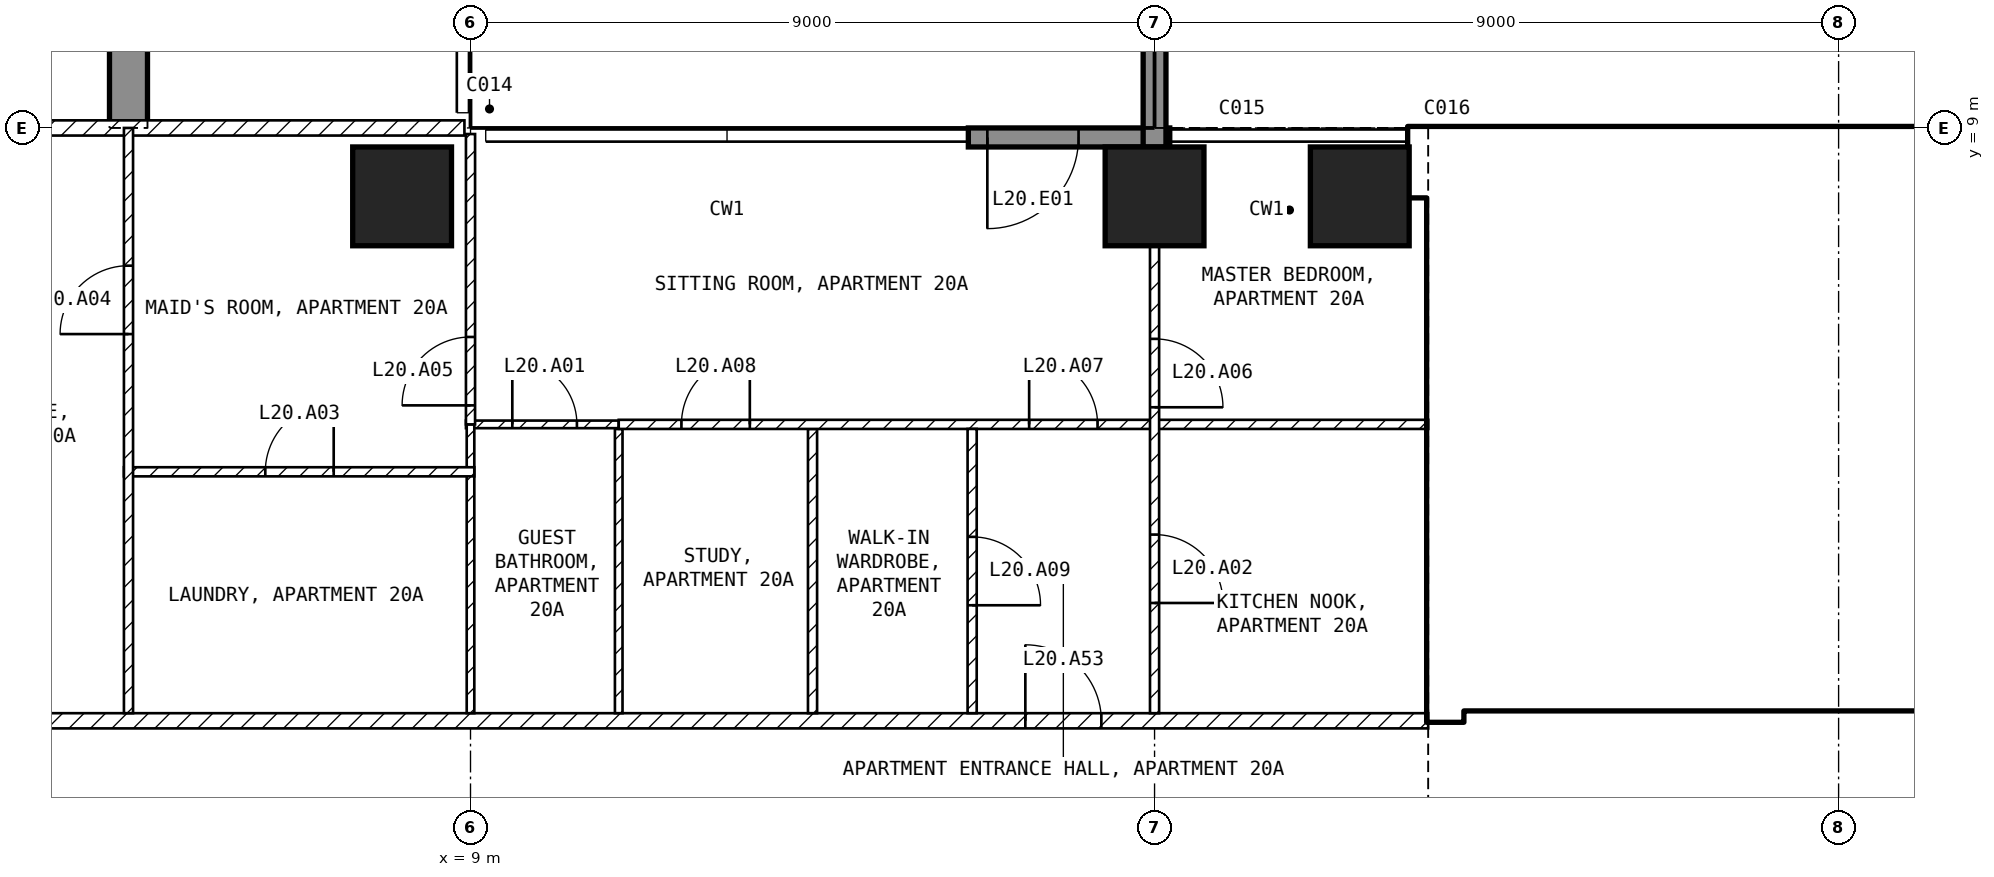
"""IFC4 building model, lengths in metres.
Left out: names, types, materials, properties, quantities, classifications, styles, units other than length and angle.
Written with IfcOpenShell. Run it as: python <this file> out.ifc"""

import sys

from ifc_helpers import new_model, si_unit, direction, frame, frame_2d, origin, origin_2d, place, context, subcontext, project, spatial, polyline, rectangle, outline, extrude, element, fill, save


model = new_model("IFC4")
c1 = context("Model", 3, precision=1e-05, world=origin(), true_north=direction((0.0, 1.0)))
c2 = subcontext(c1, "Body", "Model", "MODEL_VIEW")
j1 = project(units=[si_unit("LENGTHUNIT", "METRE"), si_unit("PLANEANGLEUNIT", "RADIAN")], contexts=[c1])
p1 = place(None, origin())
s1 = spatial("IfcSite", under=j1, at=p1, CompositionType="ELEMENT")
p2 = place(p1, origin())
s2 = spatial("IfcBuilding", under=s1, at=p2, CompositionType="ELEMENT")
p3 = place(p2, frame((0.0, 0.0, 89.0)))
s3 = spatial("IfcBuildingStorey", under=s2, at=p3, CompositionType="ELEMENT", Elevation=89.0)
for number, where, z_axis, x_axis in (
    (1, (8.1, 8.1, -0.25), (0.0, 0.0, 1.0), (1.0, 0.0, 0.0)),
    (2, (18.0, 8.1, -0.25), (0.0, 0.0, 1.0), (1.0, 0.0, 0.0)),
    (3, (20.7, 8.1, -0.25), (0.0, 0.0, 1.0), (1.0, 0.0, 0.0)),
):
    element("IfcColumn", number, at=place(p3, frame(where, z_axis=z_axis, x_axis=x_axis)), inside=s3, PredefinedType="COLUMN", context=c2, shape_type="SweptSolid", body=[
        extrude(rectangle(XDim=1.3, YDim=1.3, at=origin_2d()), origin(), (0.0, 0.0, 1.0), 3.45),
    ])
p4 = place(p3, frame((4.25, 9.0, -0.25), z_axis=(1.0, 0.0, 0.0), x_axis=(0.0, 1.0, 0.0)))
e4 = element("IfcWall", 4, at=p4, inside=s3, PredefinedType="SHEAR", context=c2, shape_type="SweptSolid", body=[
    extrude(outline(polyline([(0.0, 0.0), (2.1, 0.0), (2.1, 2.65), (4.5, 2.65), (4.5, 0.0), (9.9, 0.0), (9.9, 2.65), (12.3, 2.65), (12.3, 0.0), (16.45, 0.0), (16.45, 3.45), (0.0, 3.45), (0.0, 0.0)])), origin(), (0.0, 0.0, 1.0), 0.5),
])
p5 = place(p3, frame((18.2, 8.875, 0.0), z_axis=(0.0, 0.0, 1.0), x_axis=(-1.0, 0.0, 0.0)))
e5 = element("IfcWall", 5, at=p5, inside=s3, PredefinedType="SOLIDWALL", context=c2, shape_type="SweptSolid", body=[
    extrude(rectangle(XDim=2.65, YDim=0.25, at=frame_2d((1.325, 0.0))), origin(), (0.0, 0.0, 1.0), 3.2),
])
p6 = place(p5, frame((1.2, 0.0, 0.0)))
e6 = element("IfcOpeningElement", 6, at=p6, cuts=e5, PredefinedType="OPENING", context=c2, shape_type="SweptSolid", body=[
    extrude(rectangle(XDim=1.2, YDim=2.4, at=frame_2d((0.6, 1.2))), frame((0.0, 0.135, 0.0), z_axis=(0.0, -1.0, 0.0), x_axis=(1.0, 0.0, 0.0)), (0.0, 0.0, 1.0), 0.27),
])
p7 = place(p3, frame((18.0, 8.75, 0.0), z_axis=(0.0, 0.0, 1.0), x_axis=(0.0, 1.0, 0.0)))
e7 = element("IfcWall", 7, at=p7, inside=s3, PredefinedType="SOLIDWALL", context=c2, shape_type="SweptSolid", body=[
    extrude(rectangle(XDim=2.95, YDim=0.3, at=frame_2d((1.475, 0.0))), origin(), (0.0, 0.0, 1.0), 3.2),
])
p8 = place(p3, frame((21.35, 8.55, 0.0), z_axis=(0.0, 0.0, 1.0), x_axis=(1.0, 0.0, 0.0)))
e8 = element("IfcWall", 8, at=p8, inside=s3, PredefinedType="SHEAR", context=c2, shape_type="SweptSolid", body=[
    extrude(rectangle(XDim=10.15, YDim=0.9, at=frame_2d((5.075, 0.0))), origin(), (0.0, 0.0, 1.0), 3.2),
])
p9 = place(p3, frame((21.825, 1.2, 0.0), z_axis=(0.0, 0.0, 1.0), x_axis=(0.0, 1.0, 0.0)))
e9 = element("IfcWall", 9, at=p9, inside=s3, PredefinedType="SHEAR", context=c2, shape_type="SweptSolid", body=[
    extrude(rectangle(XDim=6.9, YDim=0.45, at=frame_2d((3.45, 0.0))), origin(), (0.0, 0.0, 1.0), 3.2),
])
p10 = place(p3, frame((22.05, 1.45, 0.0), z_axis=(0.0, 0.0, 1.0), x_axis=(1.0, 0.0, 0.0)))
e10 = element("IfcWall", 10, at=p10, inside=s3, PredefinedType="SOLIDWALL", context=c2, shape_type="SweptSolid", body=[
    extrude(rectangle(XDim=13.05, YDim=0.2, at=frame_2d((6.525, 0.0))), origin(), (0.0, 0.0, 1.0), 3.2),
])
p11 = place(p10, frame((0.75, 0.0, 0.0)))
e11 = element("IfcOpeningElement", 11, at=p11, cuts=e10, PredefinedType="OPENING", context=c2, shape_type="SweptSolid", body=[
    extrude(rectangle(XDim=1.0, YDim=2.1, at=frame_2d((0.5, 1.05))), frame((0.0, 0.11, 0.0), z_axis=(0.0, -1.0, 0.0), x_axis=(1.0, 0.0, 0.0)), (0.0, 0.0, 1.0), 0.22),
])
p12 = place(p10, frame((3.25, 0.0, 0.0)))
e12 = element("IfcOpeningElement", 12, at=p12, cuts=e10, PredefinedType="OPENING", context=c2, shape_type="SweptSolid", body=[
    extrude(rectangle(XDim=1.0, YDim=2.1, at=frame_2d((0.5, 1.05))), frame((0.0, 0.11, 0.0), z_axis=(0.0, -1.0, 0.0), x_axis=(1.0, 0.0, 0.0)), (0.0, 0.0, 1.0), 0.22),
])
p13 = place(p3, frame((22.05, 5.15, 0.0), z_axis=(0.0, 0.0, 1.0), x_axis=(1.0, 0.0, 0.0)))
e13 = element("IfcWall", 13, at=p13, inside=s3, PredefinedType="SOLIDWALL", context=c2, shape_type="SweptSolid", body=[
    extrude(rectangle(XDim=6.3, YDim=0.2, at=frame_2d((3.15, 0.0))), origin(), (0.0, 0.0, 1.0), 3.2),
])
p14 = place(p13, frame((0.2, 0.0, 0.0)))
e14 = element("IfcOpeningElement", 14, at=p14, cuts=e13, PredefinedType="OPENING", context=c2, shape_type="SweptSolid", body=[
    extrude(rectangle(XDim=1.0, YDim=2.1, at=frame_2d((0.5, 1.05))), frame((0.0, 0.11, 0.0), z_axis=(0.0, -1.0, 0.0), x_axis=(1.0, 0.0, 0.0)), (0.0, 0.0, 1.0), 0.22),
])
p15 = place(p3, frame((27.2, 3.95, 0.0), z_axis=(0.0, 0.0, 1.0), x_axis=(1.0, 0.0, 0.0)))
e15 = element("IfcWall", 15, at=p15, inside=s3, PredefinedType="SOLIDWALL", context=c2, shape_type="SweptSolid", body=[
    extrude(rectangle(XDim=7.9, YDim=0.2, at=frame_2d((3.95, 0.0))), origin(), (0.0, 0.0, 1.0), 3.2),
])
p16 = place(p3, frame((27.1, 1.55, 0.0), z_axis=(0.0, 0.0, 1.0), x_axis=(0.0, 1.0, 0.0)))
e16 = element("IfcWall", 16, at=p16, inside=s3, PredefinedType="SOLIDWALL", context=c2, shape_type="SweptSolid", body=[
    extrude(rectangle(XDim=3.5, YDim=0.2, at=frame_2d((1.75, 0.0))), origin(), (0.0, 0.0, 1.0), 3.2),
])
p17 = place(p16, frame((0.6, 0.0, 0.0)))
e17 = element("IfcOpeningElement", 17, at=p17, cuts=e16, PredefinedType="OPENING", context=c2, shape_type="SweptSolid", body=[
    extrude(rectangle(XDim=1.1, YDim=2.1, at=frame_2d((0.55, 1.05))), frame((0.0, 0.11, 0.0), z_axis=(0.0, -1.0, 0.0), x_axis=(1.0, 0.0, 0.0)), (0.0, 0.0, 1.0), 0.22),
])
p18 = place(p16, frame((2.6, 0.0, 0.0)))
e18 = element("IfcOpeningElement", 18, at=p18, cuts=e16, PredefinedType="OPENING", context=c2, shape_type="SweptSolid", body=[
    extrude(rectangle(XDim=0.8, YDim=2.1, at=frame_2d((0.4, 1.05))), frame((0.0, 0.11, 0.0), z_axis=(0.0, -1.0, 0.0), x_axis=(1.0, 0.0, 0.0)), (0.0, 0.0, 1.0), 0.22),
])
p19 = place(p3, frame((1.1, 1.2, 0.0), z_axis=(0.0, 0.0, 1.0), x_axis=(1.0, 0.0, 0.0)))
e19 = element("IfcWall", 19, at=p19, inside=s3, PredefinedType="PARTITIONING", context=c2, shape_type="SweptSolid", body=[
    extrude(rectangle(XDim=20.5, YDim=0.2, at=frame_2d((10.25, 0.0))), origin(), (0.0, 0.0, 1.0), 3.2),
])
p20 = place(p19, frame((15.2, 0.0, 0.0)))
e20 = element("IfcOpeningElement", 20, at=p20, cuts=e19, PredefinedType="OPENING", context=c2, shape_type="SweptSolid", body=[
    extrude(rectangle(XDim=1.0, YDim=2.1, at=frame_2d((0.5, 1.05))), frame((0.0, 0.11, 0.0), z_axis=(0.0, -1.0, 0.0), x_axis=(1.0, 0.0, 0.0)), (0.0, 0.0, 1.0), 0.22),
])
p21 = place(p3, frame((-8.92, 9.0, 0.0), z_axis=(0.0, 0.0, 1.0), x_axis=(1.0, 0.0, 0.0)))
e21 = element("IfcWall", 21, at=p21, inside=s3, PredefinedType="PARTITIONING", context=c2, shape_type="SweptSolid", body=[
    extrude(rectangle(XDim=17.84, YDim=0.2, at=frame_2d((8.92, 0.0))), origin(), (0.0, 0.0, 1.0), 3.2),
])
p22 = place(p21, frame((8.42, 0.0, 0.0)))
e22 = element("IfcOpeningElement", 22, at=p22, cuts=e21, PredefinedType="OPENING", context=c2, shape_type="SweptSolid", body=[
    extrude(rectangle(XDim=1.0, YDim=2.1, at=frame_2d((0.5, 1.05))), frame((0.0, 0.11, 0.0), z_axis=(0.0, -1.0, 0.0), x_axis=(1.0, 0.0, 0.0)), (0.0, 0.0, 1.0), 0.22),
])
p23 = place(p3, frame((10.95, 5.04, 0.0), z_axis=(0.0, 0.0, 1.0), x_axis=(0.0, -1.0, 0.0)))
e23 = element("IfcWall", 23, at=p23, inside=s3, PredefinedType="PARTITIONING", context=c2, shape_type="SweptSolid", body=[
    extrude(rectangle(XDim=3.74, YDim=0.1, at=frame_2d((1.87, 0.0))), origin(), (0.0, 0.0, 1.0), 3.2),
])
p24 = place(p3, frame((8.94, 5.1, 0.0), z_axis=(0.0, 0.0, 1.0), x_axis=(1.0, 0.0, 0.0)))
e24 = element("IfcWall", 24, at=p24, inside=s3, PredefinedType="PARTITIONING", context=c2, shape_type="SweptSolid", body=[
    extrude(rectangle(XDim=2.01, YDim=0.1, at=frame_2d((1.005, 0.0))), origin(), (0.0, 0.0, 1.0), 3.2),
])
p25 = place(p24, frame((0.61, 0.0, 0.0)))
e25 = element("IfcOpeningElement", 25, at=p25, cuts=e24, PredefinedType="OPENING", context=c2, shape_type="SweptSolid", body=[
    extrude(rectangle(XDim=0.85, YDim=2.1, at=frame_2d((0.425, 1.05))), frame((0.0, 0.06, 0.0), z_axis=(0.0, -1.0, 0.0), x_axis=(1.0, 0.0, 0.0)), (0.0, 0.0, 1.0), 0.12),
])
p26 = place(p3, frame((9.0, 1.3, 0.0), z_axis=(0.0, 0.0, 1.0), x_axis=(0.0, 1.0, 0.0)))
e26 = element("IfcWall", 26, at=p26, inside=s3, PredefinedType="PARTITIONING", context=c2, shape_type="SweptSolid", body=[
    extrude(rectangle(XDim=3.8, YDim=0.1, at=frame_2d((1.9, 0.0))), origin(), (0.0, 0.0, 1.0), 3.2),
])
p27 = place(p3, frame((13.5, 5.04, 0.0), z_axis=(0.0, 0.0, 1.0), x_axis=(0.0, -1.0, 0.0)))
e27 = element("IfcWall", 27, at=p27, inside=s3, PredefinedType="PARTITIONING", context=c2, shape_type="SweptSolid", body=[
    extrude(rectangle(XDim=3.74, YDim=0.12, at=frame_2d((1.87, 0.0))), origin(), (0.0, 0.0, 1.0), 3.2),
])
p28 = place(p3, frame((10.95, 5.1, 0.0), z_axis=(0.0, 0.0, 1.0), x_axis=(1.0, 0.0, 0.0)))
e28 = element("IfcWall", 28, at=p28, inside=s3, PredefinedType="PARTITIONING", context=c2, shape_type="SweptSolid", body=[
    extrude(rectangle(XDim=10.65, YDim=0.12, at=frame_2d((5.325, 0.0))), origin(), (0.0, 0.0, 1.0), 3.2),
])
p29 = place(p28, frame((5.4, 0.0, 0.0)))
e29 = element("IfcOpeningElement", 29, at=p29, cuts=e28, PredefinedType="OPENING", context=c2, shape_type="SweptSolid", body=[
    extrude(rectangle(XDim=0.9, YDim=2.1, at=frame_2d((0.45, 1.05))), frame((0.0, 0.07, 0.0), z_axis=(0.0, -1.0, 0.0), x_axis=(1.0, 0.0, 0.0)), (0.0, 0.0, 1.0), 0.14),
])
p30 = place(p28, frame((0.825, 0.0, 0.0)))
e30 = element("IfcOpeningElement", 30, at=p30, cuts=e28, PredefinedType="OPENING", context=c2, shape_type="SweptSolid", body=[
    extrude(rectangle(XDim=0.9, YDim=2.1, at=frame_2d((0.45, 1.05))), frame((0.0, 0.07, 0.0), z_axis=(0.0, -1.0, 0.0), x_axis=(1.0, 0.0, 0.0)), (0.0, 0.0, 1.0), 0.14),
])
p31 = place(p3, frame((15.6, 5.04, 0.0), z_axis=(0.0, 0.0, 1.0), x_axis=(0.0, -1.0, 0.0)))
e31 = element("IfcWall", 31, at=p31, inside=s3, PredefinedType="PARTITIONING", context=c2, shape_type="SweptSolid", body=[
    extrude(rectangle(XDim=3.74, YDim=0.12, at=frame_2d((1.87, 0.0))), origin(), (0.0, 0.0, 1.0), 3.2),
])
p32 = place(p31, frame((1.42, 0.0, 0.0)))
e32 = element("IfcOpeningElement", 32, at=p32, cuts=e31, PredefinedType="OPENING", context=c2, shape_type="SweptSolid", body=[
    extrude(rectangle(XDim=0.9, YDim=2.1, at=frame_2d((0.45, 1.05))), frame((0.0, 0.07, 0.0), z_axis=(0.0, -1.0, 0.0), x_axis=(1.0, 0.0, 0.0)), (0.0, 0.0, 1.0), 0.14),
])
p33 = place(p3, frame((18.0, 7.45, 0.0), z_axis=(0.0, 0.0, 1.0), x_axis=(0.0, -1.0, 0.0)))
e33 = element("IfcWall", 33, at=p33, inside=s3, PredefinedType="PARTITIONING", context=c2, shape_type="SweptSolid", body=[
    extrude(rectangle(XDim=6.15, YDim=0.12, at=frame_2d((3.075, 0.0))), origin(), (0.0, 0.0, 1.0), 2.296),
])
p34 = place(p33, frame((3.8, 0.0, 0.0)))
e34 = element("IfcOpeningElement", 34, at=p34, cuts=e33, PredefinedType="OPENING", context=c2, shape_type="SweptSolid", body=[
    extrude(rectangle(XDim=0.9, YDim=2.1, at=frame_2d((0.45, 1.05))), frame((0.0, 0.07, 0.0), z_axis=(0.0, -1.0, 0.0), x_axis=(1.0, 0.0, 0.0)), (0.0, 0.0, 1.0), 0.14),
])
p35 = place(p33, frame((1.225, 0.0, 0.0)))
e35 = element("IfcOpeningElement", 35, at=p35, cuts=e33, PredefinedType="OPENING", context=c2, shape_type="SweptSolid", body=[
    extrude(rectangle(XDim=0.9, YDim=2.1, at=frame_2d((0.45, 1.05))), frame((0.0, 0.07, 0.0), z_axis=(0.0, -1.0, 0.0), x_axis=(1.0, 0.0, 0.0)), (0.0, 0.0, 1.0), 0.14),
])
p36 = place(p3, frame((9.0, 5.1, 0.0), z_axis=(0.0, 0.0, 1.0), x_axis=(0.0, 1.0, 0.0)))
e36 = element("IfcWall", 36, at=p36, inside=s3, PredefinedType="PARTITIONING", context=c2, shape_type="SweptSolid", body=[
    extrude(rectangle(XDim=3.82, YDim=0.12, at=frame_2d((1.91, 0.0))), origin(), (0.0, 0.0, 1.0), 3.2),
])
p37 = place(p36, frame((0.25, 0.0, 0.0)))
e37 = element("IfcOpeningElement", 37, at=p37, cuts=e36, PredefinedType="OPENING", context=c2, shape_type="SweptSolid", body=[
    extrude(rectangle(XDim=0.9, YDim=2.1, at=frame_2d((0.45, 1.05))), frame((0.0, 0.07, 0.0), z_axis=(0.0, -1.0, 0.0), x_axis=(1.0, 0.0, 0.0)), (0.0, 0.0, 1.0), 0.14),
])
p38 = place(p3, frame((4.44, 4.476, 0.0), z_axis=(0.0, 0.0, 1.0), x_axis=(1.0, 0.0, 0.0)))
e38 = element("IfcWall", 38, at=p38, inside=s3, PredefinedType="PARTITIONING", context=c2, shape_type="SweptSolid", body=[
    extrude(rectangle(XDim=4.61, YDim=0.12, at=frame_2d((2.305, 0.0))), origin(), (0.0, 0.0, 1.0), 3.2),
])
p39 = place(p38, frame((1.86, 0.0, 0.0)))
e39 = element("IfcOpeningElement", 39, at=p39, cuts=e38, PredefinedType="OPENING", context=c2, shape_type="SweptSolid", body=[
    extrude(rectangle(XDim=0.9, YDim=2.1, at=frame_2d((0.45, 1.05))), frame((0.0, 0.07, 0.0), z_axis=(0.0, -1.0, 0.0), x_axis=(1.0, 0.0, 0.0)), (0.0, 0.0, 1.0), 0.14),
])
p40 = place(p3, frame((4.5, 1.3, 0.0), z_axis=(0.0, 0.0, 1.0), x_axis=(0.0, 1.0, 0.0)))
e40 = element("IfcWall", 40, at=p40, inside=s3, PredefinedType="PARTITIONING", context=c2, shape_type="SweptSolid", body=[
    extrude(rectangle(XDim=7.7, YDim=0.12, at=frame_2d((3.85, 0.0))), origin(), (0.0, 0.0, 1.0), 3.2),
])
p41 = place(p40, frame((4.988, 0.0, 0.0)))
e41 = element("IfcOpeningElement", 41, at=p41, cuts=e40, PredefinedType="OPENING", context=c2, shape_type="SweptSolid", body=[
    extrude(rectangle(XDim=0.9, YDim=2.1, at=frame_2d((0.45, 1.05))), frame((0.0, 0.07, 0.0), z_axis=(0.0, -1.0, 0.0), x_axis=(1.0, 0.0, 0.0)), (0.0, 0.0, 1.0), 0.14),
])
p42 = place(p6, origin())
e42 = element("IfcDoor", 42, at=p42, inside=s3, OperationType="SINGLE_SWING_RIGHT", PredefinedType="DOOR", context=c2, shape_type="SweptSolid", body=[
    extrude(rectangle(XDim=1.2, YDim=2.4, at=frame_2d((0.6, 1.2))), frame((0.0, 0.025, 0.0), z_axis=(0.0, -1.0, 0.0), x_axis=(1.0, 0.0, 0.0)), (0.0, 0.0, 1.0), 0.05),
])
fill(e6, e42)
p43 = place(p17, origin())
e43 = element("IfcDoor", 43, at=p43, inside=s3, OperationType="DOUBLE_DOOR_SLIDING", PredefinedType="DOOR", context=c2, shape_type="SweptSolid", body=[
    extrude(rectangle(XDim=1.1, YDim=2.1, at=frame_2d((0.55, 1.05))), frame((0.0, 0.025, 0.0), z_axis=(0.0, -1.0, 0.0), x_axis=(1.0, 0.0, 0.0)), (0.0, 0.0, 1.0), 0.05),
])
fill(e17, e43)
p44 = place(p14, origin())
e44 = element("IfcDoor", 44, at=p44, inside=s3, OperationType="SINGLE_SWING_LEFT", PredefinedType="DOOR", context=c2, shape_type="SweptSolid", body=[
    extrude(rectangle(XDim=1.0, YDim=2.1, at=frame_2d((0.5, 1.05))), frame((0.0, 0.025, 0.0), z_axis=(0.0, -1.0, 0.0), x_axis=(1.0, 0.0, 0.0)), (0.0, 0.0, 1.0), 0.05),
])
fill(e14, e44)
p45 = place(p11, origin())
e45 = element("IfcDoor", 45, at=p45, inside=s3, OperationType="SINGLE_SWING_LEFT", PredefinedType="DOOR", context=c2, shape_type="SweptSolid", body=[
    extrude(rectangle(XDim=1.0, YDim=2.1, at=frame_2d((0.5, 1.05))), frame((0.0, 0.025, 0.0), z_axis=(0.0, -1.0, 0.0), x_axis=(1.0, 0.0, 0.0)), (0.0, 0.0, 1.0), 0.05),
])
fill(e11, e45)
p46 = place(p12, origin())
e46 = element("IfcDoor", 46, at=p46, inside=s3, OperationType="SINGLE_SWING_LEFT", PredefinedType="DOOR", context=c2, shape_type="SweptSolid", body=[
    extrude(rectangle(XDim=1.0, YDim=2.1, at=frame_2d((0.5, 1.05))), frame((0.0, 0.025, 0.0), z_axis=(0.0, -1.0, 0.0), x_axis=(1.0, 0.0, 0.0)), (0.0, 0.0, 1.0), 0.05),
])
fill(e12, e46)
p47 = place(p18, origin())
e47 = element("IfcDoor", 47, at=p47, inside=s3, OperationType="SINGLE_SWING_LEFT", PredefinedType="DOOR", context=c2, shape_type="SweptSolid", body=[
    extrude(rectangle(XDim=0.8, YDim=2.1, at=frame_2d((0.4, 1.05))), frame((0.0, 0.025, 0.0), z_axis=(0.0, -1.0, 0.0), x_axis=(1.0, 0.0, 0.0)), (0.0, 0.0, 1.0), 0.05),
])
fill(e18, e47)
p48 = place(p25, origin())
e48 = element("IfcDoor", 48, at=p48, inside=s3, OperationType="SINGLE_SWING_LEFT", PredefinedType="DOOR", context=c2, shape_type="SweptSolid", body=[
    extrude(rectangle(XDim=0.85, YDim=2.1, at=frame_2d((0.425, 1.05))), frame((0.0, 0.025, 0.0), z_axis=(0.0, -1.0, 0.0), x_axis=(1.0, 0.0, 0.0)), (0.0, 0.0, 1.0), 0.05),
])
fill(e25, e48)
p49 = place(p34, origin())
e49 = element("IfcDoor", 49, at=p49, inside=s3, OperationType="SINGLE_SWING_RIGHT", PredefinedType="DOOR", context=c2, shape_type="SweptSolid", body=[
    extrude(rectangle(XDim=0.9, YDim=2.1, at=frame_2d((0.45, 1.05))), frame((0.0, 0.025, 0.0), z_axis=(0.0, -1.0, 0.0), x_axis=(1.0, 0.0, 0.0)), (0.0, 0.0, 1.0), 0.05),
])
fill(e34, e49)
p50 = place(p39, origin())
e50 = element("IfcDoor", 50, at=p50, inside=s3, OperationType="SINGLE_SWING_RIGHT", PredefinedType="DOOR", context=c2, shape_type="SweptSolid", body=[
    extrude(rectangle(XDim=0.9, YDim=2.1, at=frame_2d((0.45, 1.05))), frame((0.0, 0.025, 0.0), z_axis=(0.0, -1.0, 0.0), x_axis=(1.0, 0.0, 0.0)), (0.0, 0.0, 1.0), 0.05),
])
fill(e39, e50)
p51 = place(p41, origin())
e51 = element("IfcDoor", 51, at=p51, inside=s3, OperationType="SINGLE_SWING_LEFT", PredefinedType="DOOR", context=c2, shape_type="SweptSolid", body=[
    extrude(rectangle(XDim=0.9, YDim=2.1, at=frame_2d((0.45, 1.05))), frame((0.0, 0.025, 0.0), z_axis=(0.0, -1.0, 0.0), x_axis=(1.0, 0.0, 0.0)), (0.0, 0.0, 1.0), 0.05),
])
fill(e41, e51)
p52 = place(p37, origin())
e52 = element("IfcDoor", 52, at=p52, inside=s3, OperationType="SINGLE_SWING_LEFT", PredefinedType="DOOR", context=c2, shape_type="SweptSolid", body=[
    extrude(rectangle(XDim=0.9, YDim=2.1, at=frame_2d((0.45, 1.05))), frame((0.0, 0.025, 0.0), z_axis=(0.0, -1.0, 0.0), x_axis=(1.0, 0.0, 0.0)), (0.0, 0.0, 1.0), 0.05),
])
fill(e37, e52)
p53 = place(p35, origin())
e53 = element("IfcDoor", 53, at=p53, inside=s3, OperationType="SINGLE_SWING_RIGHT", PredefinedType="DOOR", context=c2, shape_type="SweptSolid", body=[
    extrude(rectangle(XDim=0.9, YDim=2.1, at=frame_2d((0.45, 1.05))), frame((0.0, 0.025, 0.0), z_axis=(0.0, -1.0, 0.0), x_axis=(1.0, 0.0, 0.0)), (0.0, 0.0, 1.0), 0.05),
])
fill(e35, e53)
p54 = place(p29, origin())
e54 = element("IfcDoor", 54, at=p54, inside=s3, OperationType="SINGLE_SWING_LEFT", PredefinedType="DOOR", context=c2, shape_type="SweptSolid", body=[
    extrude(rectangle(XDim=0.9, YDim=2.1, at=frame_2d((0.45, 1.05))), frame((0.0, 0.025, 0.0), z_axis=(0.0, -1.0, 0.0), x_axis=(1.0, 0.0, 0.0)), (0.0, 0.0, 1.0), 0.05),
])
fill(e29, e54)
p55 = place(p30, origin())
e55 = element("IfcDoor", 55, at=p55, inside=s3, OperationType="SINGLE_SWING_RIGHT", PredefinedType="DOOR", context=c2, shape_type="SweptSolid", body=[
    extrude(rectangle(XDim=0.9, YDim=2.1, at=frame_2d((0.45, 1.05))), frame((0.0, 0.025, 0.0), z_axis=(0.0, -1.0, 0.0), x_axis=(1.0, 0.0, 0.0)), (0.0, 0.0, 1.0), 0.05),
])
fill(e30, e55)
p56 = place(p32, origin())
e56 = element("IfcDoor", 56, at=p56, inside=s3, OperationType="SINGLE_SWING_RIGHT", PredefinedType="DOOR", context=c2, shape_type="SweptSolid", body=[
    extrude(rectangle(XDim=0.9, YDim=2.1, at=frame_2d((0.45, 1.05))), frame((0.0, 0.025, 0.0), z_axis=(0.0, -1.0, 0.0), x_axis=(1.0, 0.0, 0.0)), (0.0, 0.0, 1.0), 0.05),
])
fill(e32, e56)
p57 = place(p20, origin())
e57 = element("IfcDoor", 57, at=p57, inside=s3, OperationType="SINGLE_SWING_LEFT", PredefinedType="DOOR", context=c2, shape_type="SweptSolid", body=[
    extrude(rectangle(XDim=1.0, YDim=2.1, at=frame_2d((0.5, 1.05))), frame((0.0, 0.025, 0.0), z_axis=(0.0, -1.0, 0.0), x_axis=(1.0, 0.0, 0.0)), (0.0, 0.0, 1.0), 0.05),
])
fill(e20, e57)
save(model, sys.argv[1])
